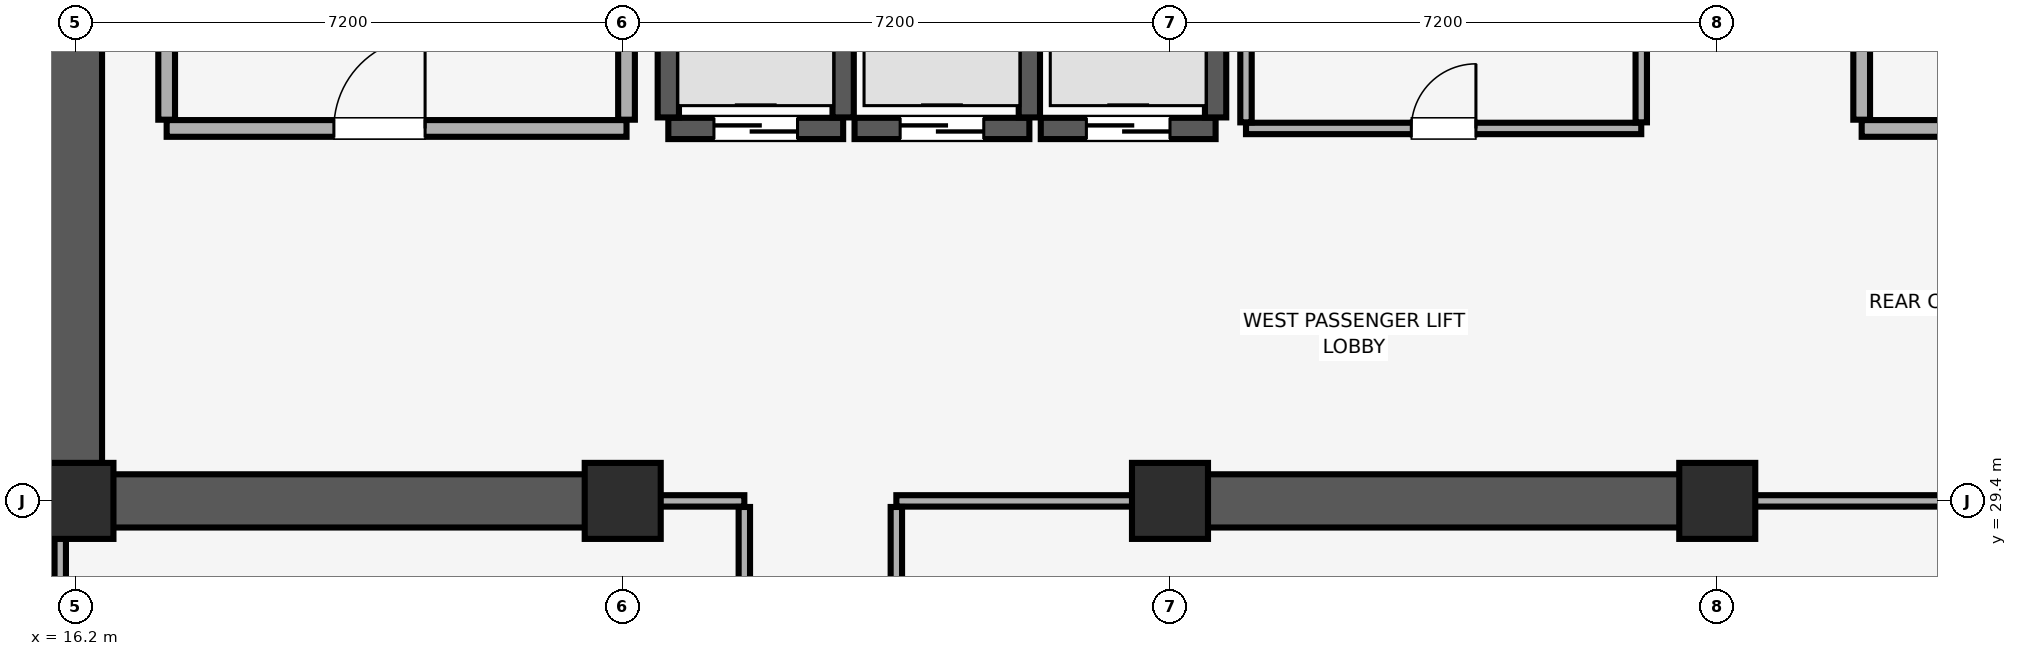
"""IFC4 building model, lengths in metres.
Left out: names, types, materials, properties, quantities, classifications, styles, units other than length and angle.
Written with IfcOpenShell. Run it as: python <this file> out.ifc"""

import sys

from ifc_helpers import new_model, si_unit, direction, frame, frame_2d, origin, origin_2d, place, context, subcontext, project, spatial, rectangle, extrude, element, fill, save


model = new_model("IFC4")
c1 = context("Model", 3, precision=1e-05, world=origin(), true_north=direction((0.0, 1.0)))
c2 = subcontext(c1, "Body", "Model", "MODEL_VIEW")
j1 = project(units=[si_unit("LENGTHUNIT", "METRE"), si_unit("PLANEANGLEUNIT", "RADIAN")], contexts=[c1])
p1 = place(None, origin())
s1 = spatial("IfcSite", under=j1, at=p1, CompositionType="ELEMENT")
p2 = place(p1, origin())
s2 = spatial("IfcBuilding", under=s1, at=p2, CompositionType="ELEMENT")
p3 = place(p2, frame((0.0, 0.0, 229.15)))
s3 = spatial("IfcBuildingStorey", under=s2, at=p3, CompositionType="ELEMENT", Elevation=229.15)
for number, where, z_axis, x_axis in (
    (1, (16.2, 29.4, 0.0), (0.0, 0.0, 1.0), (1.0, 0.0, 0.0)),
    (2, (23.4, 29.4, 0.0), (0.0, 0.0, 1.0), (1.0, 0.0, 0.0)),
    (3, (30.6, 29.4, 0.0), (0.0, 0.0, 1.0), (1.0, 0.0, 0.0)),
    (4, (37.8, 29.4, 0.0), (0.0, 0.0, 1.0), (1.0, 0.0, 0.0)),
):
    element("IfcColumn", number, at=place(p3, frame(where, z_axis=z_axis, x_axis=x_axis)), inside=s3, PredefinedType="COLUMN", context=c2, shape_type="SweptSolid", body=[
        extrude(rectangle(XDim=1.0, YDim=1.0, at=origin_2d()), origin(), (0.0, 0.0, 1.0), 3.71),
    ])
p4 = place(p3, frame((16.2, 29.4, 0.0), z_axis=(0.0, 0.0, 1.0), x_axis=(0.0, 1.0, 0.0)))
e5 = element("IfcWall", 5, at=p4, inside=s3, PredefinedType="SHEAR", context=c2, shape_type="SweptSolid", body=[
    extrude(rectangle(XDim=19.2, YDim=0.7, at=frame_2d((9.6, 0.0))), origin(), (0.0, 0.0, 1.0), 3.71),
])
p5 = place(p3, frame((16.555, 29.4, 0.0), z_axis=(0.0, 0.0, 1.0), x_axis=(1.0, 0.0, 0.0)))
e6 = element("IfcWall", 6, at=p5, inside=s3, PredefinedType="SHEAR", context=c2, shape_type="SweptSolid", body=[
    extrude(rectangle(XDim=7.045, YDim=0.7, at=frame_2d((3.522, 0.0))), origin(), (0.0, 0.0, 1.0), 3.71),
])
p6 = place(p3, frame((30.4, 29.4, 0.0), z_axis=(0.0, 0.0, 1.0), x_axis=(1.0, 0.0, 0.0)))
e7 = element("IfcWall", 7, at=p6, inside=s3, PredefinedType="SHEAR", context=c2, shape_type="SweptSolid", body=[
    extrude(rectangle(XDim=7.6, YDim=0.7, at=frame_2d((3.8, 0.0))), origin(), (0.0, 0.0, 1.0), 3.71),
])
p7 = place(p3, frame((24.0, 34.3, 0.0), z_axis=(0.0, 0.0, 1.0), x_axis=(1.0, 0.0, 0.0)))
e8 = element("IfcWall", 8, at=p7, inside=s3, PredefinedType="SHEAR", context=c2, shape_type="SweptSolid", body=[
    extrude(rectangle(XDim=2.3, YDim=0.28, at=frame_2d((1.15, 0.0))), origin(), (0.0, 0.0, 1.0), 3.71),
])
p8 = place(p7, frame((0.6, 0.0, 0.0)))
e9 = element("IfcOpeningElement", 9, at=p8, cuts=e8, PredefinedType="OPENING", context=c2, shape_type="SweptSolid", body=[
    extrude(rectangle(XDim=1.1, YDim=2.2, at=frame_2d((0.55, 1.1))), frame((0.0, 0.15, 0.0), z_axis=(0.0, -1.0, 0.0), x_axis=(1.0, 0.0, 0.0)), (0.0, 0.0, 1.0), 0.3),
])
for number, where, z_axis, x_axis in (
    (10, (24.0, 34.445, 0.0), (0.0, 0.0, 1.0), (0.0, 1.0, 0.0)),
    (11, (26.3, 34.445, 0.0), (0.0, 0.0, 1.0), (0.0, 1.0, 0.0)),
):
    element("IfcWall", number, at=place(p3, frame(where, z_axis=z_axis, x_axis=x_axis)), inside=s3, PredefinedType="SHEAR", context=c2, shape_type="SweptSolid", body=[
        extrude(rectangle(XDim=2.01, YDim=0.28, at=frame_2d((1.005, 0.0))), origin(), (0.0, 0.0, 1.0), 3.71),
    ])
p9 = place(p3, frame((26.45, 34.3, 0.0), z_axis=(0.0, 0.0, 1.0), x_axis=(1.0, 0.0, 0.0)))
e12 = element("IfcWall", 12, at=p9, inside=s3, PredefinedType="SHEAR", context=c2, shape_type="SweptSolid", body=[
    extrude(rectangle(XDim=2.3, YDim=0.28, at=frame_2d((1.15, 0.0))), origin(), (0.0, 0.0, 1.0), 3.71),
])
p10 = place(p9, frame((0.6, 0.0, 0.0)))
e13 = element("IfcOpeningElement", 13, at=p10, cuts=e12, PredefinedType="OPENING", context=c2, shape_type="SweptSolid", body=[
    extrude(rectangle(XDim=1.1, YDim=2.2, at=frame_2d((0.55, 1.1))), frame((0.0, 0.15, 0.0), z_axis=(0.0, -1.0, 0.0), x_axis=(1.0, 0.0, 0.0)), (0.0, 0.0, 1.0), 0.3),
])
p11 = place(p3, frame((28.75, 34.445, 0.0), z_axis=(0.0, 0.0, 1.0), x_axis=(0.0, 1.0, 0.0)))
e14 = element("IfcWall", 14, at=p11, inside=s3, PredefinedType="SHEAR", context=c2, shape_type="SweptSolid", body=[
    extrude(rectangle(XDim=2.01, YDim=0.28, at=frame_2d((1.005, 0.0))), origin(), (0.0, 0.0, 1.0), 3.71),
])
p12 = place(p3, frame((28.9, 34.3, 0.0), z_axis=(0.0, 0.0, 1.0), x_axis=(1.0, 0.0, 0.0)))
e15 = element("IfcWall", 15, at=p12, inside=s3, PredefinedType="SHEAR", context=c2, shape_type="SweptSolid", body=[
    extrude(rectangle(XDim=2.3, YDim=0.28, at=frame_2d((1.15, 0.0))), origin(), (0.0, 0.0, 1.0), 3.71),
])
p13 = place(p12, frame((0.6, 0.0, 0.0)))
e16 = element("IfcOpeningElement", 16, at=p13, cuts=e15, PredefinedType="OPENING", context=c2, shape_type="SweptSolid", body=[
    extrude(rectangle(XDim=1.1, YDim=2.2, at=frame_2d((0.55, 1.1))), frame((0.0, 0.15, 0.0), z_axis=(0.0, -1.0, 0.0), x_axis=(1.0, 0.0, 0.0)), (0.0, 0.0, 1.0), 0.3),
])
p14 = place(p3, frame((31.2, 34.445, 0.0), z_axis=(0.0, 0.0, 1.0), x_axis=(0.0, 1.0, 0.0)))
e17 = element("IfcWall", 17, at=p14, inside=s3, PredefinedType="SHEAR", context=c2, shape_type="SweptSolid", body=[
    extrude(rectangle(XDim=2.01, YDim=0.28, at=frame_2d((1.005, 0.0))), origin(), (0.0, 0.0, 1.0), 3.71),
])
p15 = place(p3, frame((17.4, 34.3, 0.0), z_axis=(0.0, 0.0, 1.0), x_axis=(1.0, 0.0, 0.0)))
e18 = element("IfcWall", 18, at=p15, inside=s3, PredefinedType="PARTITIONING", context=c2, shape_type="SweptSolid", body=[
    extrude(rectangle(XDim=6.05, YDim=0.22, at=frame_2d((3.025, 0.0))), origin(), (0.0, 0.0, 1.0), 3.71),
])
p16 = place(p15, frame((2.2, 0.0, 0.0)))
e19 = element("IfcOpeningElement", 19, at=p16, cuts=e18, PredefinedType="OPENING", context=c2, shape_type="SweptSolid", body=[
    extrude(rectangle(XDim=1.2, YDim=2.15, at=frame_2d((0.6, 1.075))), frame((0.0, 0.12, 0.0), z_axis=(0.0, -1.0, 0.0), x_axis=(1.0, 0.0, 0.0)), (0.0, 0.0, 1.0), 0.24),
])
p17 = place(p3, frame((17.4, 34.415, 0.0), z_axis=(0.0, 0.0, 1.0), x_axis=(0.0, 1.0, 0.0)))
e20 = element("IfcWall", 20, at=p17, inside=s3, PredefinedType="PARTITIONING", context=c2, shape_type="SweptSolid", body=[
    extrude(rectangle(XDim=5.43, YDim=0.22, at=frame_2d((2.715, 0.0))), origin(), (0.0, 0.0, 1.0), 3.71),
])
p18 = place(p3, frame((23.45, 34.415, 0.0), z_axis=(0.0, 0.0, 1.0), x_axis=(0.0, 1.0, 0.0)))
e21 = element("IfcWall", 21, at=p18, inside=s3, PredefinedType="PARTITIONING", context=c2, shape_type="SweptSolid", body=[
    extrude(rectangle(XDim=5.64, YDim=0.22, at=frame_2d((2.82, 0.0))), origin(), (0.0, 0.0, 1.0), 3.71),
])
p19 = place(p3, frame((39.7, 34.3, 0.0), z_axis=(0.0, 0.0, 1.0), x_axis=(1.0, 0.0, 0.0)))
e22 = element("IfcWall", 22, at=p19, inside=s3, PredefinedType="PARTITIONING", context=c2, shape_type="SweptSolid", body=[
    extrude(rectangle(XDim=4.6, YDim=0.22, at=frame_2d((2.3, 0.0))), origin(), (0.0, 0.0, 1.0), 3.71),
])
p20 = place(p19, frame((1.7, 0.0, 0.0)))
e23 = element("IfcOpeningElement", 23, at=p20, cuts=e22, PredefinedType="OPENING", context=c2, shape_type="SweptSolid", body=[
    extrude(rectangle(XDim=1.2, YDim=2.15, at=frame_2d((0.6, 1.075))), frame((0.0, 0.12, 0.0), z_axis=(0.0, -1.0, 0.0), x_axis=(1.0, 0.0, 0.0)), (0.0, 0.0, 1.0), 0.24),
])
p21 = place(p3, frame((39.7, 34.415, 0.0), z_axis=(0.0, 0.0, 1.0), x_axis=(0.0, 1.0, 0.0)))
e24 = element("IfcWall", 24, at=p21, inside=s3, PredefinedType="PARTITIONING", context=c2, shape_type="SweptSolid", body=[
    extrude(rectangle(XDim=5.785, YDim=0.22, at=frame_2d((2.893, 0.0))), origin(), (0.0, 0.0, 1.0), 3.71),
])
p22 = place(p3, frame((31.6, 34.3, 0.0), z_axis=(0.0, 0.0, 1.0), x_axis=(1.0, 0.0, 0.0)))
e25 = element("IfcWall", 25, at=p22, inside=s3, PredefinedType="PARTITIONING", context=c2, shape_type="SweptSolid", body=[
    extrude(rectangle(XDim=5.2, YDim=0.15, at=frame_2d((2.6, 0.0))), origin(), (0.0, 0.0, 1.0), 3.71),
])
p23 = place(p22, frame((2.175, 0.0, 0.0)))
e26 = element("IfcOpeningElement", 26, at=p23, cuts=e25, PredefinedType="OPENING", context=c2, shape_type="SweptSolid", body=[
    extrude(rectangle(XDim=0.85, YDim=2.1, at=frame_2d((0.425, 1.05))), frame((0.0, 0.085, 0.0), z_axis=(0.0, -1.0, 0.0), x_axis=(1.0, 0.0, 0.0)), (0.0, 0.0, 1.0), 0.17),
])
for number, where, z_axis, x_axis in (
    (27, (31.6, 34.38, 0.0), (0.0, 0.0, 1.0), (0.0, 1.0, 0.0)),
    (28, (36.8, 34.38, 0.0), (0.0, 0.0, 1.0), (0.0, 1.0, 0.0)),
):
    element("IfcWall", number, at=place(p3, frame(where, z_axis=z_axis, x_axis=x_axis)), inside=s3, PredefinedType="PARTITIONING", context=c2, shape_type="SweptSolid", body=[
        extrude(rectangle(XDim=4.94, YDim=0.15, at=frame_2d((2.47, 0.0))), origin(), (0.0, 0.0, 1.0), 3.71),
    ])
p24 = place(p3, frame((23.61, 29.4, 0.0), z_axis=(0.0, 0.0, 1.0), x_axis=(1.0, 0.0, 0.0)))
e29 = element("IfcWall", 29, at=p24, inside=s3, PredefinedType="PARTITIONING", context=c2, shape_type="SweptSolid", body=[
    extrude(rectangle(XDim=1.39, YDim=0.15, at=frame_2d((0.695, 0.0))), origin(), (0.0, 0.0, 1.0), 2.61),
])
p25 = place(p3, frame((16.0, 13.68, 0.0), z_axis=(0.0, 0.0, 1.0), x_axis=(0.0, 1.0, 0.0)))
e30 = element("IfcWall", 30, at=p25, inside=s3, PredefinedType="PARTITIONING", context=c2, shape_type="SweptSolid", body=[
    extrude(rectangle(XDim=15.71, YDim=0.15, at=frame_2d((7.855, 0.0))), origin(), (0.0, 0.0, 1.0), 3.26),
])
p26 = place(p3, frame((25.0, 13.68, 0.0), z_axis=(0.0, 0.0, 1.0), x_axis=(0.0, 1.0, 0.0)))
e31 = element("IfcWall", 31, at=p26, inside=s3, PredefinedType="PARTITIONING", context=c2, shape_type="SweptSolid", body=[
    extrude(rectangle(XDim=15.64, YDim=0.15, at=frame_2d((7.82, 0.0))), origin(), (0.0, 0.0, 1.0), 3.71),
])
p27 = place(p3, frame((27.0, 29.4, 0.0), z_axis=(0.0, 0.0, 1.0), x_axis=(1.0, 0.0, 0.0)))
e32 = element("IfcWall", 32, at=p27, inside=s3, PredefinedType="PARTITIONING", context=c2, shape_type="SweptSolid", body=[
    extrude(rectangle(XDim=3.39, YDim=0.15, at=frame_2d((1.695, 0.0))), origin(), (0.0, 0.0, 1.0), 2.61),
])
p28 = place(p3, frame((38.01, 29.4, 0.0), z_axis=(0.0, 0.0, 1.0), x_axis=(1.0, 0.0, 0.0)))
e33 = element("IfcWall", 33, at=p28, inside=s3, PredefinedType="PARTITIONING", context=c2, shape_type="SweptSolid", body=[
    extrude(rectangle(XDim=4.39, YDim=0.15, at=frame_2d((2.195, 0.0))), origin(), (0.0, 0.0, 1.0), 2.61),
])
p29 = place(p3, frame((27.0, 13.68, 0.0), z_axis=(0.0, 0.0, 1.0), x_axis=(0.0, 1.0, 0.0)))
e34 = element("IfcWall", 34, at=p29, inside=s3, PredefinedType="PARTITIONING", context=c2, shape_type="SweptSolid", body=[
    extrude(rectangle(XDim=15.64, YDim=0.15, at=frame_2d((7.82, 0.0))), origin(), (0.0, 0.0, 1.0), 3.26),
])
p30 = place(p8, origin())
e35 = element("IfcDoor", 35, at=p30, inside=s3, OperationType="DOUBLE_DOOR_SLIDING", PredefinedType="DOOR", context=c2, shape_type="SweptSolid", body=[
    extrude(rectangle(XDim=1.1, YDim=2.2, at=frame_2d((0.55, 1.1))), frame((0.0, 0.025, 0.0), z_axis=(0.0, -1.0, 0.0), x_axis=(1.0, 0.0, 0.0)), (0.0, 0.0, 1.0), 0.05),
])
fill(e9, e35)
p31 = place(p10, origin())
e36 = element("IfcDoor", 36, at=p31, inside=s3, OperationType="DOUBLE_DOOR_SLIDING", PredefinedType="DOOR", context=c2, shape_type="SweptSolid", body=[
    extrude(rectangle(XDim=1.1, YDim=2.2, at=frame_2d((0.55, 1.1))), frame((0.0, 0.025, 0.0), z_axis=(0.0, -1.0, 0.0), x_axis=(1.0, 0.0, 0.0)), (0.0, 0.0, 1.0), 0.05),
])
fill(e13, e36)
p32 = place(p13, origin())
e37 = element("IfcDoor", 37, at=p32, inside=s3, OperationType="DOUBLE_DOOR_SLIDING", PredefinedType="DOOR", context=c2, shape_type="SweptSolid", body=[
    extrude(rectangle(XDim=1.1, YDim=2.2, at=frame_2d((0.55, 1.1))), frame((0.0, 0.025, 0.0), z_axis=(0.0, -1.0, 0.0), x_axis=(1.0, 0.0, 0.0)), (0.0, 0.0, 1.0), 0.05),
])
fill(e16, e37)
p33 = place(p16, origin())
e38 = element("IfcDoor", 38, at=p33, inside=s3, OperationType="SINGLE_SWING_RIGHT", PredefinedType="DOOR", context=c2, shape_type="SweptSolid", body=[
    extrude(rectangle(XDim=1.2, YDim=2.15, at=frame_2d((0.6, 1.075))), frame((0.0, 0.025, 0.0), z_axis=(0.0, -1.0, 0.0), x_axis=(1.0, 0.0, 0.0)), (0.0, 0.0, 1.0), 0.05),
])
fill(e19, e38)
p34 = place(p23, origin())
e39 = element("IfcDoor", 39, at=p34, inside=s3, OperationType="SINGLE_SWING_RIGHT", PredefinedType="DOOR", context=c2, shape_type="SweptSolid", body=[
    extrude(rectangle(XDim=0.85, YDim=2.1, at=frame_2d((0.425, 1.05))), frame((0.0, 0.025, 0.0), z_axis=(0.0, -1.0, 0.0), x_axis=(1.0, 0.0, 0.0)), (0.0, 0.0, 1.0), 0.05),
])
fill(e26, e39)
save(model, sys.argv[1])
